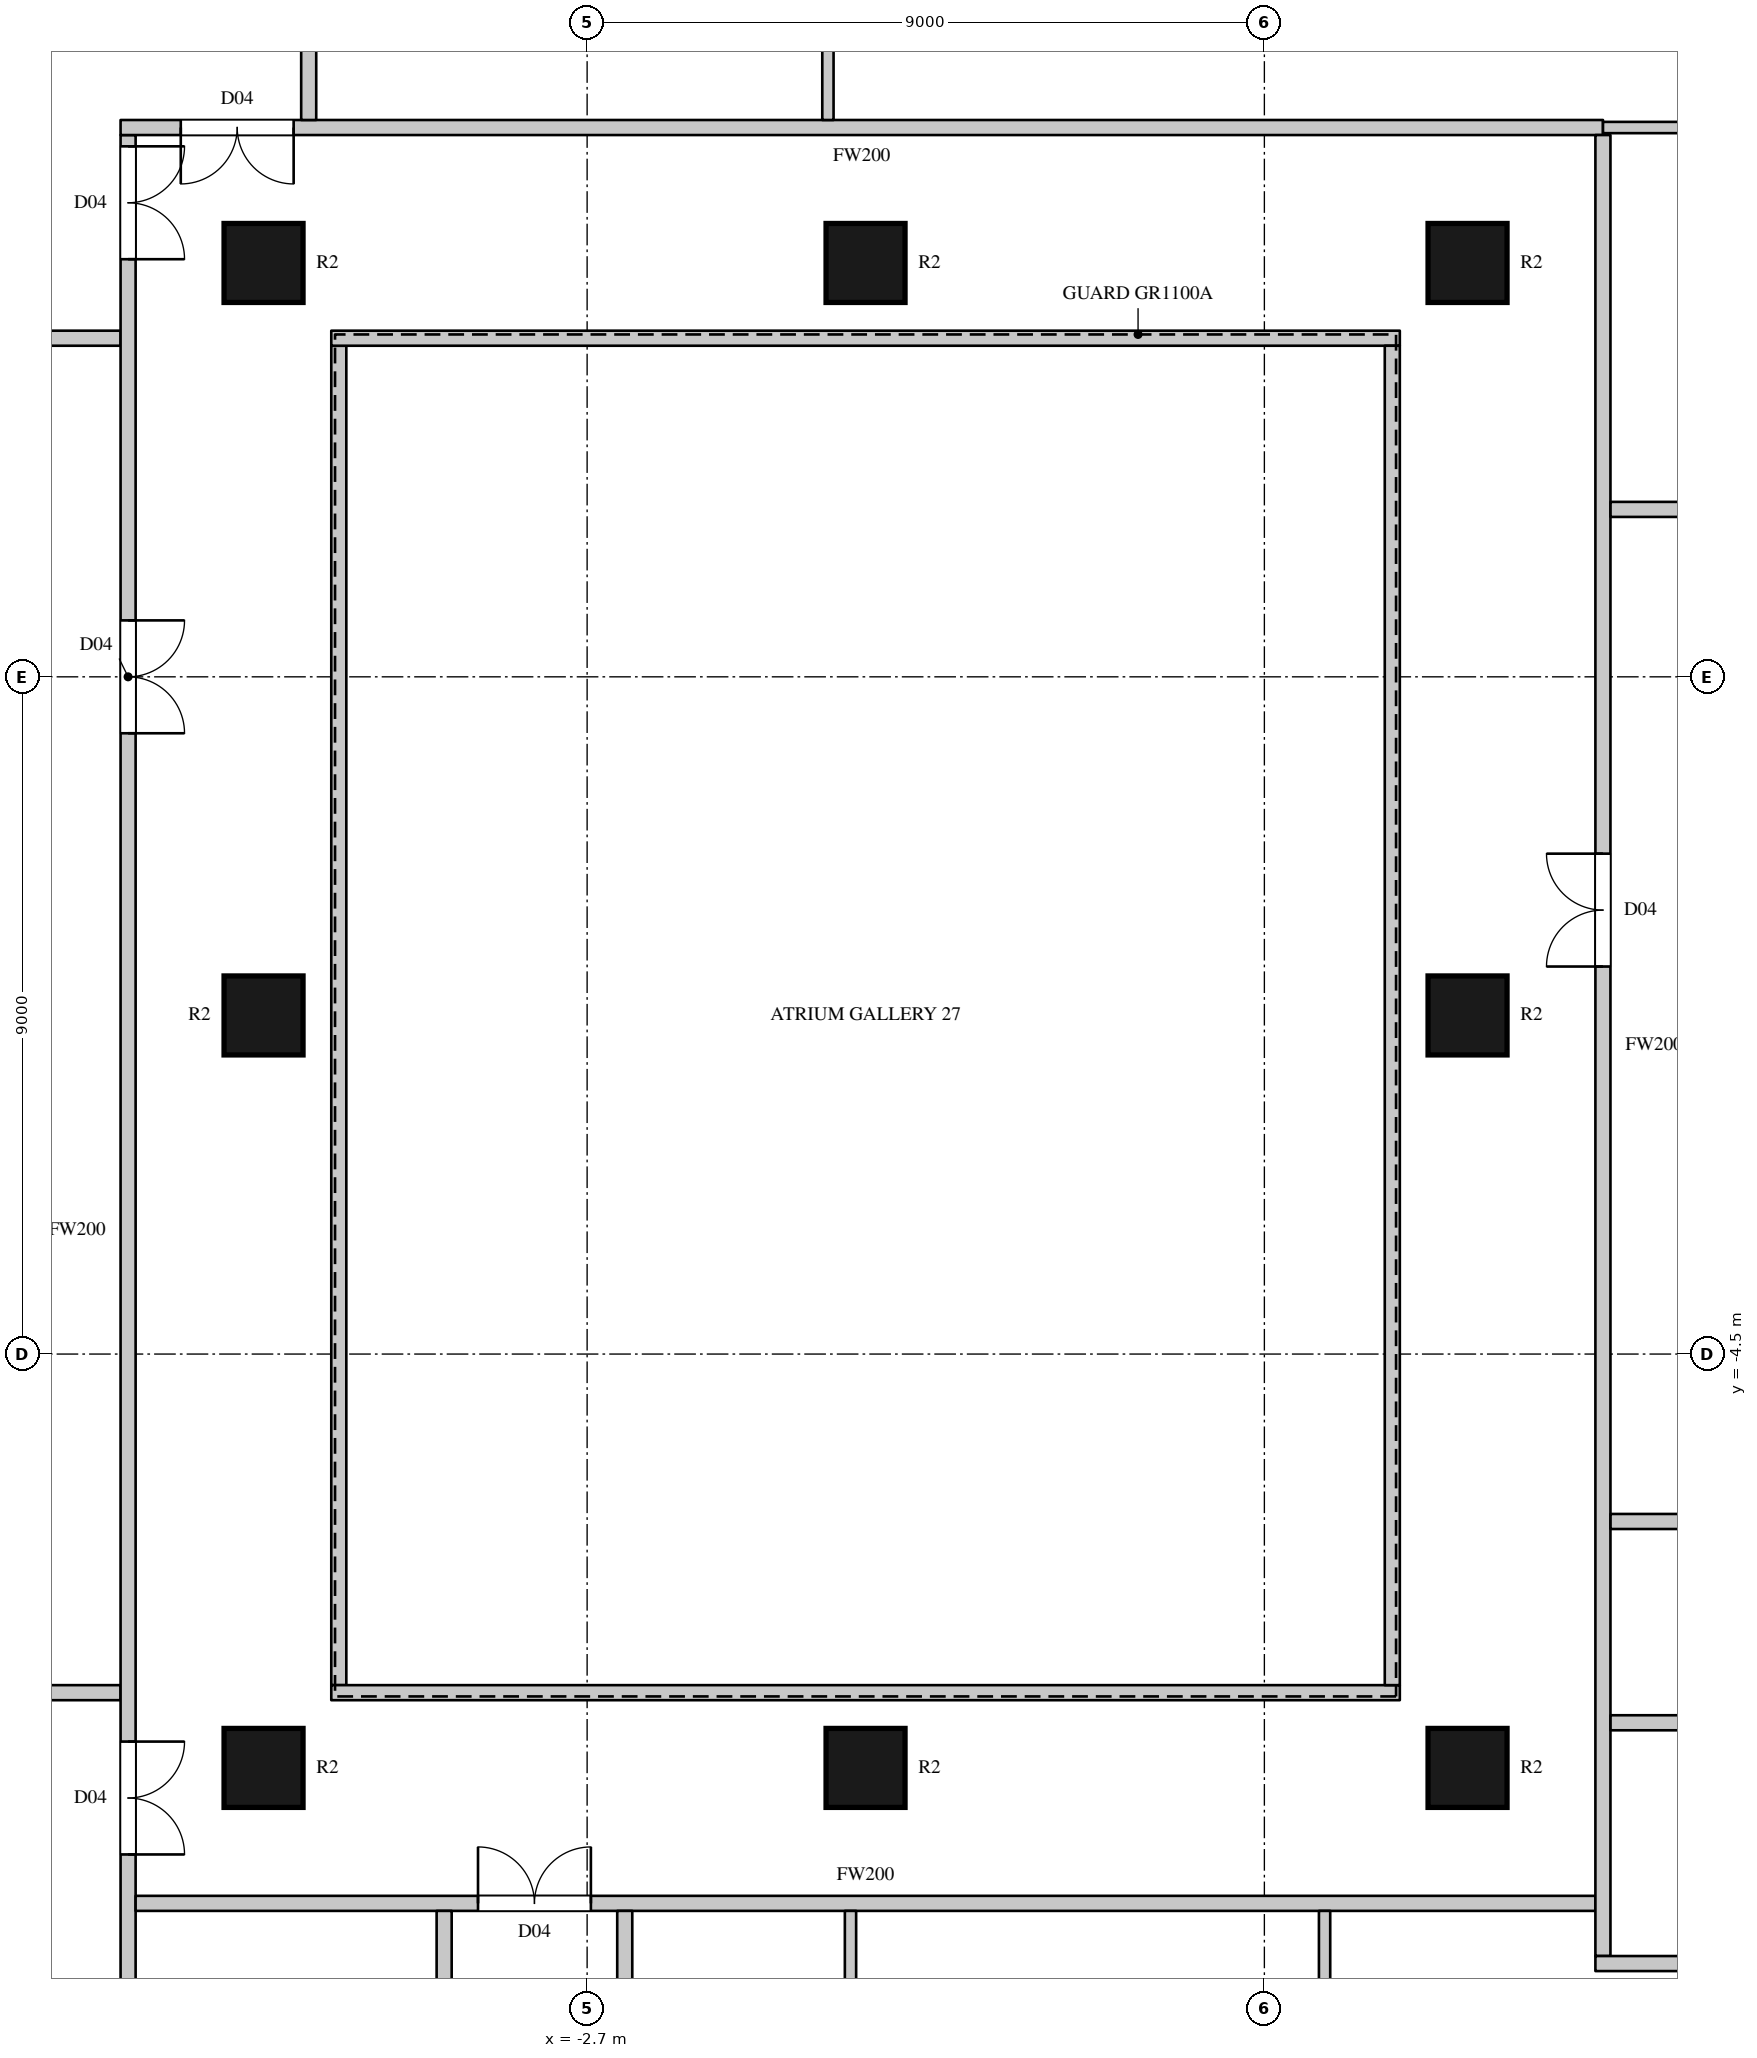
"""IFC4 building model, lengths in metres.
Left out: names, types, materials, properties, quantities, classifications, styles, units other than length and angle.
Written with IfcOpenShell. Run it as: python <this file> out.ifc"""

import sys

from ifc_helpers import new_model, si_unit, direction, frame, frame_2d, origin, origin_2d, place, context, subcontext, project, spatial, rectangle, circle, extrude, element, fill, save


model = new_model("IFC4")
c1 = context("Model", 3, precision=1e-05, world=origin(), true_north=direction((0.0, 1.0)))
c2 = subcontext(c1, "Body", "Model", "MODEL_VIEW")
j1 = project(units=[si_unit("LENGTHUNIT", "METRE"), si_unit("PLANEANGLEUNIT", "RADIAN")], contexts=[c1])
p1 = place(None, origin())
s1 = spatial("IfcSite", under=j1, at=p1, CompositionType="ELEMENT")
p2 = place(p1, origin())
s2 = spatial("IfcBuilding", under=s1, at=p2, CompositionType="ELEMENT")
p3 = place(p2, frame((0.0, 0.0, 127.5)))
s3 = spatial("IfcBuildingStorey", under=s2, at=p3, CompositionType="ELEMENT", Elevation=127.5)
for number, where, z_axis, x_axis in (
    (1, (-7.0, -10.0, 0.0), (0.0, 0.0, 1.0), (1.0, 0.0, 0.0)),
    (2, (-7.0, 0.0, 0.0), (0.0, 0.0, 1.0), (1.0, 0.0, 0.0)),
    (3, (-7.0, 10.0, 0.0), (0.0, 0.0, 1.0), (1.0, 0.0, 0.0)),
    (4, (1.0, -10.0, 0.0), (0.0, 0.0, 1.0), (1.0, 0.0, 0.0)),
    (5, (1.0, 10.0, 0.0), (0.0, 0.0, 1.0), (1.0, 0.0, 0.0)),
    (6, (9.0, -10.0, 0.0), (0.0, 0.0, 1.0), (1.0, 0.0, 0.0)),
    (7, (9.0, 0.0, 0.0), (0.0, 0.0, 1.0), (1.0, 0.0, 0.0)),
    (8, (9.0, 10.0, 0.0), (0.0, 0.0, 1.0), (1.0, 0.0, 0.0)),
):
    element("IfcColumn", number, at=place(p3, frame(where, z_axis=z_axis, x_axis=x_axis)), inside=s3, PredefinedType="COLUMN", context=c2, shape_type="SweptSolid", body=[
        extrude(circle(Radius=0.525, at=origin_2d()), origin(), (0.0, 0.0, 1.0), 3.6),
    ])
p4 = place(p3, frame((-13.97, -9.0, 0.0), z_axis=(0.0, 0.0, 1.0), x_axis=(1.0, 0.0, 0.0)))
e9 = element("IfcWall", 9, at=p4, inside=s3, PredefinedType="PARTITIONING", context=c2, shape_type="SweptSolid", body=[
    extrude(rectangle(XDim=5.07, YDim=0.2, at=frame_2d((2.535, 0.0))), origin(), (0.0, 0.0, 1.0), 3.3),
])
p5 = place(p4, frame((0.4, 0.0, 0.0)))
e10 = element("IfcOpeningElement", 10, at=p5, cuts=e9, PredefinedType="OPENING", context=c2, shape_type="SweptSolid", body=[
    extrude(rectangle(XDim=1.5, YDim=2.2, at=frame_2d((0.75, 1.1))), frame((0.0, 0.11, 0.0), z_axis=(0.0, -1.0, 0.0), x_axis=(1.0, 0.0, 0.0)), (0.0, 0.0, 1.0), 0.22),
])
p6 = place(p4, frame((2.05, 0.0, 0.0)))
e11 = element("IfcOpeningElement", 11, at=p6, cuts=e9, PredefinedType="OPENING", context=c2, shape_type="SweptSolid", body=[
    extrude(rectangle(XDim=1.5, YDim=2.2, at=frame_2d((0.75, 1.1))), frame((0.0, 0.11, 0.0), z_axis=(0.0, -1.0, 0.0), x_axis=(1.0, 0.0, 0.0)), (0.0, 0.0, 1.0), 0.22),
])
p7 = place(p3, frame((-13.97, 9.0, 0.0), z_axis=(0.0, 0.0, 1.0), x_axis=(1.0, 0.0, 0.0)))
e12 = element("IfcWall", 12, at=p7, inside=s3, PredefinedType="PARTITIONING", context=c2, shape_type="SweptSolid", body=[
    extrude(rectangle(XDim=5.07, YDim=0.2, at=frame_2d((2.535, 0.0))), origin(), (0.0, 0.0, 1.0), 3.3),
])
p8 = place(p3, frame((-8.8, -17.4, 0.0), z_axis=(0.0, 0.0, 1.0), x_axis=(0.0, 1.0, 0.0)))
e13 = element("IfcWall", 13, at=p8, inside=s3, PredefinedType="PARTITIONING", context=c2, shape_type="SweptSolid", body=[
    extrude(rectangle(XDim=29.1, YDim=0.2, at=frame_2d((14.55, 0.0))), origin(), (0.0, 0.0, 1.0), 3.3),
])
p9 = place(p8, frame((21.15, 0.0, 0.0)))
e14 = element("IfcOpeningElement", 14, at=p9, cuts=e13, PredefinedType="OPENING", context=c2, shape_type="SweptSolid", body=[
    extrude(rectangle(XDim=1.5, YDim=2.2, at=frame_2d((0.75, 1.1))), frame((0.0, 0.11, 0.0), z_axis=(0.0, -1.0, 0.0), x_axis=(1.0, 0.0, 0.0)), (0.0, 0.0, 1.0), 0.22),
])
p10 = place(p8, frame((6.25, 0.0, 0.0)))
e15 = element("IfcOpeningElement", 15, at=p10, cuts=e13, PredefinedType="OPENING", context=c2, shape_type="SweptSolid", body=[
    extrude(rectangle(XDim=1.5, YDim=2.2, at=frame_2d((0.75, 1.1))), frame((0.0, 0.11, 0.0), z_axis=(0.0, -1.0, 0.0), x_axis=(1.0, 0.0, 0.0)), (0.0, 0.0, 1.0), 0.22),
])
p11 = place(p8, frame((27.45, 0.0, 0.0)))
e16 = element("IfcOpeningElement", 16, at=p11, cuts=e13, PredefinedType="OPENING", context=c2, shape_type="SweptSolid", body=[
    extrude(rectangle(XDim=1.5, YDim=2.2, at=frame_2d((0.75, 1.1))), frame((0.0, 0.11, 0.0), z_axis=(0.0, -1.0, 0.0), x_axis=(1.0, 0.0, 0.0)), (0.0, 0.0, 1.0), 0.22),
])
p12 = place(p8, frame((0.15, 0.0, 0.0)))
e17 = element("IfcOpeningElement", 17, at=p12, cuts=e13, PredefinedType="OPENING", context=c2, shape_type="SweptSolid", body=[
    extrude(rectangle(XDim=0.9, YDim=2.2, at=frame_2d((0.45, 1.1))), frame((0.0, 0.11, 0.0), z_axis=(0.0, -1.0, 0.0), x_axis=(1.0, 0.0, 0.0)), (0.0, 0.0, 1.0), 0.22),
])
p13 = place(p3, frame((-8.7, -11.8, 0.0), z_axis=(0.0, 0.0, 1.0), x_axis=(1.0, 0.0, 0.0)))
e18 = element("IfcWall", 18, at=p13, inside=s3, PredefinedType="PARTITIONING", context=c2, shape_type="SweptSolid", body=[
    extrude(rectangle(XDim=19.4, YDim=0.2, at=frame_2d((9.7, 0.0))), origin(), (0.0, 0.0, 1.0), 3.3),
])
p14 = place(p13, frame((4.55, 0.0, 0.0)))
e19 = element("IfcOpeningElement", 19, at=p14, cuts=e18, PredefinedType="OPENING", context=c2, shape_type="SweptSolid", body=[
    extrude(rectangle(XDim=1.5, YDim=2.2, at=frame_2d((0.75, 1.1))), frame((0.0, 0.11, 0.0), z_axis=(0.0, -1.0, 0.0), x_axis=(1.0, 0.0, 0.0)), (0.0, 0.0, 1.0), 0.22),
])
p15 = place(p3, frame((-8.9, 11.8, 0.0), z_axis=(0.0, 0.0, 1.0), x_axis=(1.0, 0.0, 0.0)))
e20 = element("IfcWall", 20, at=p15, inside=s3, PredefinedType="PARTITIONING", context=c2, shape_type="SweptSolid", body=[
    extrude(rectangle(XDim=19.7, YDim=0.2, at=frame_2d((9.85, 0.0))), origin(), (0.0, 0.0, 1.0), 3.3),
])
p16 = place(p15, frame((0.8, 0.0, 0.0)))
e21 = element("IfcOpeningElement", 21, at=p16, cuts=e20, PredefinedType="OPENING", context=c2, shape_type="SweptSolid", body=[
    extrude(rectangle(XDim=1.5, YDim=2.2, at=frame_2d((0.75, 1.1))), frame((0.0, 0.11, 0.0), z_axis=(0.0, -1.0, 0.0), x_axis=(1.0, 0.0, 0.0)), (0.0, 0.0, 1.0), 0.22),
])
p17 = place(p3, frame((-6.4, 11.9, 0.0), z_axis=(0.0, 0.0, 1.0), x_axis=(0.0, 1.0, 0.0)))
e22 = element("IfcWall", 22, at=p17, inside=s3, PredefinedType="PARTITIONING", context=c2, shape_type="SweptSolid", body=[
    extrude(rectangle(XDim=5.5, YDim=0.2, at=frame_2d((2.75, 0.0))), origin(), (0.0, 0.0, 1.0), 3.3),
])
p18 = place(p17, frame((3.75, 0.0, 0.0)))
e23 = element("IfcOpeningElement", 23, at=p18, cuts=e22, PredefinedType="OPENING", context=c2, shape_type="SweptSolid", body=[
    extrude(rectangle(XDim=1.6, YDim=2.4, at=frame_2d((0.8, 1.2))), frame((0.0, 0.11, 0.0), z_axis=(0.0, -1.0, 0.0), x_axis=(1.0, 0.0, 0.0)), (0.0, 0.0, 1.0), 0.22),
])
p19 = place(p3, frame((-6.0, -8.9, 0.0), z_axis=(0.0, 0.0, 1.0), x_axis=(0.0, 1.0, 0.0)))
e24 = element("IfcWall", 24, at=p19, inside=s3, PredefinedType="PARTITIONING", context=c2, shape_type="SweptSolid", body=[
    extrude(rectangle(XDim=17.8, YDim=0.2, at=frame_2d((8.9, 0.0))), origin(), (0.0, 0.0, 1.0), 3.3),
])
for number, where, z_axis, x_axis in (
    (25, (-6.1, -9.0, 0.0), (0.0, 0.0, 1.0), (1.0, 0.0, 0.0)),
    (26, (-6.1, 9.0, 0.0), (0.0, 0.0, 1.0), (1.0, 0.0, 0.0)),
):
    element("IfcWall", number, at=place(p3, frame(where, z_axis=z_axis, x_axis=x_axis)), inside=s3, PredefinedType="PARTITIONING", context=c2, shape_type="SweptSolid", body=[
        extrude(rectangle(XDim=14.2, YDim=0.2, at=frame_2d((7.1, 0.0))), origin(), (0.0, 0.0, 1.0), 3.3),
    ])
p20 = place(p3, frame((-4.6, -17.4, 0.0), z_axis=(0.0, 0.0, 1.0), x_axis=(0.0, 1.0, 0.0)))
e27 = element("IfcWall", 27, at=p20, inside=s3, PredefinedType="PARTITIONING", context=c2, shape_type="SweptSolid", body=[
    extrude(rectangle(XDim=5.5, YDim=0.2, at=frame_2d((2.75, 0.0))), origin(), (0.0, 0.0, 1.0), 3.3),
])
p21 = place(p3, frame((-2.2, -17.178, 0.0), z_axis=(0.0, 0.0, 1.0), x_axis=(0.0, 1.0, 0.0)))
e28 = element("IfcWall", 28, at=p21, inside=s3, PredefinedType="PARTITIONING", context=c2, shape_type="SweptSolid", body=[
    extrude(rectangle(XDim=5.279, YDim=0.2, at=frame_2d((2.639, 0.0))), origin(), (0.0, 0.0, 1.0), 3.3),
])
p22 = place(p21, frame((0.35, 0.0, 0.0)))
e29 = element("IfcOpeningElement", 29, at=p22, cuts=e28, PredefinedType="OPENING", context=c2, shape_type="SweptSolid", body=[
    extrude(rectangle(XDim=0.9, YDim=2.2, at=frame_2d((0.45, 1.1))), frame((0.0, 0.11, 0.0), z_axis=(0.0, -1.0, 0.0), x_axis=(1.0, 0.0, 0.0)), (0.0, 0.0, 1.0), 0.22),
])
p23 = place(p3, frame((8.0, -8.9, 0.0), z_axis=(0.0, 0.0, 1.0), x_axis=(0.0, 1.0, 0.0)))
e30 = element("IfcWall", 30, at=p23, inside=s3, PredefinedType="PARTITIONING", context=c2, shape_type="SweptSolid", body=[
    extrude(rectangle(XDim=17.8, YDim=0.2, at=frame_2d((8.9, 0.0))), origin(), (0.0, 0.0, 1.0), 3.3),
])
p24 = place(p3, frame((10.799, -12.5, 0.0), z_axis=(0.0, 0.0, 1.0), x_axis=(0.0, 1.0, 0.0)))
e31 = element("IfcWall", 31, at=p24, inside=s3, PredefinedType="PARTITIONING", context=c2, shape_type="SweptSolid", body=[
    extrude(rectangle(XDim=24.2, YDim=0.2, at=frame_2d((12.1, 0.0))), origin(), (0.0, 0.0, 1.0), 3.3),
])
p25 = place(p24, frame((13.15, 0.0, 0.0)))
e32 = element("IfcOpeningElement", 32, at=p25, cuts=e31, PredefinedType="OPENING", context=c2, shape_type="SweptSolid", body=[
    extrude(rectangle(XDim=1.5, YDim=2.2, at=frame_2d((0.75, 1.1))), frame((0.0, 0.11, 0.0), z_axis=(0.0, -1.0, 0.0), x_axis=(1.0, 0.0, 0.0)), (0.0, 0.0, 1.0), 0.22),
])
p26 = place(p3, frame((10.699, -12.6, 0.0), z_axis=(0.0, 0.0, 1.0), x_axis=(1.0, 0.0, 0.0)))
e33 = element("IfcWall", 33, at=p26, inside=s3, PredefinedType="PARTITIONING", context=c2, shape_type="SweptSolid", body=[
    extrude(rectangle(XDim=5.501, YDim=0.2, at=frame_2d((2.75, 0.0))), origin(), (0.0, 0.0, 1.0), 3.3),
])
p27 = place(p3, frame((10.9, -9.4, 0.0), z_axis=(0.0, 0.0, 1.0), x_axis=(1.0, 0.0, 0.0)))
e34 = element("IfcWall", 34, at=p27, inside=s3, PredefinedType="PARTITIONING", context=c2, shape_type="SweptSolid", body=[
    extrude(rectangle(XDim=5.3, YDim=0.2, at=frame_2d((2.65, 0.0))), origin(), (0.0, 0.0, 1.0), 3.3),
])
p28 = place(p27, frame((4.05, 0.0, 0.0)))
e35 = element("IfcOpeningElement", 35, at=p28, cuts=e34, PredefinedType="OPENING", context=c2, shape_type="SweptSolid", body=[
    extrude(rectangle(XDim=0.95, YDim=2.2, at=frame_2d((0.475, 1.1))), frame((0.0, 0.11, 0.0), z_axis=(0.0, -1.0, 0.0), x_axis=(1.0, 0.0, 0.0)), (0.0, 0.0, 1.0), 0.22),
])
p29 = place(p3, frame((10.9, -6.725, 0.0), z_axis=(0.0, 0.0, 1.0), x_axis=(1.0, 0.0, 0.0)))
e36 = element("IfcWall", 36, at=p29, inside=s3, PredefinedType="PARTITIONING", context=c2, shape_type="SweptSolid", body=[
    extrude(rectangle(XDim=5.3, YDim=0.2, at=frame_2d((2.65, 0.0))), origin(), (0.0, 0.0, 1.0), 3.3),
])
p30 = place(p3, frame((10.9, 6.725, 0.0), z_axis=(0.0, 0.0, 1.0), x_axis=(1.0, 0.0, 0.0)))
e37 = element("IfcWall", 37, at=p30, inside=s3, PredefinedType="PARTITIONING", context=c2, shape_type="SweptSolid", body=[
    extrude(rectangle(XDim=5.3, YDim=0.2, at=frame_2d((2.65, 0.0))), origin(), (0.0, 0.0, 1.0), 3.3),
])
p31 = place(p30, frame((4.1, 0.0, 0.0)))
e38 = element("IfcOpeningElement", 38, at=p31, cuts=e37, PredefinedType="OPENING", context=c2, shape_type="SweptSolid", body=[
    extrude(rectangle(XDim=0.9, YDim=2.2, at=frame_2d((0.45, 1.1))), frame((0.0, 0.11, 0.0), z_axis=(0.0, -1.0, 0.0), x_axis=(1.0, 0.0, 0.0)), (0.0, 0.0, 1.0), 0.22),
])
for number, where, z_axis, x_axis in (
    (39, (0.5, 11.9, 0.0), (0.0, 0.0, 1.0), (0.0, 1.0, 0.0)),
    (40, (0.8, -17.4, 0.0), (0.0, 0.0, 1.0), (0.0, 1.0, 0.0)),
    (41, (7.1, -17.4, 0.0), (0.0, 0.0, 1.0), (0.0, 1.0, 0.0)),
):
    element("IfcWall", number, at=place(p3, frame(where, z_axis=z_axis, x_axis=x_axis)), inside=s3, PredefinedType="PARTITIONING", context=c2, shape_type="SweptSolid", body=[
        extrude(rectangle(XDim=5.5, YDim=0.15, at=frame_2d((2.75, 0.0))), origin(), (0.0, 0.0, 1.0), 3.3),
    ])
p32 = place(p3, frame((10.8, 11.8, 0.0), z_axis=(0.0, 0.0, 1.0), x_axis=(1.0, 0.0, 0.0)))
e42 = element("IfcWall", 42, at=p32, inside=s3, PredefinedType="PARTITIONING", context=c2, shape_type="SweptSolid", body=[
    extrude(rectangle(XDim=5.2, YDim=0.15, at=frame_2d((2.6, 0.0))), origin(), (0.0, 0.0, 1.0), 3.3),
])
p33 = place(p9, origin())
e43 = element("IfcDoor", 43, at=p33, inside=s3, OperationType="DOUBLE_DOOR_SINGLE_SWING", PredefinedType="DOOR", context=c2, shape_type="SweptSolid", body=[
    extrude(rectangle(XDim=1.5, YDim=2.2, at=frame_2d((0.75, 1.1))), frame((0.0, 0.025, 0.0), z_axis=(0.0, -1.0, 0.0), x_axis=(1.0, 0.0, 0.0)), (0.0, 0.0, 1.0), 0.05),
])
fill(e14, e43)
p34 = place(p10, origin())
e44 = element("IfcDoor", 44, at=p34, inside=s3, OperationType="DOUBLE_DOOR_SINGLE_SWING", PredefinedType="DOOR", context=c2, shape_type="SweptSolid", body=[
    extrude(rectangle(XDim=1.5, YDim=2.2, at=frame_2d((0.75, 1.1))), frame((0.0, 0.025, 0.0), z_axis=(0.0, -1.0, 0.0), x_axis=(1.0, 0.0, 0.0)), (0.0, 0.0, 1.0), 0.05),
])
fill(e15, e44)
p35 = place(p11, origin())
e45 = element("IfcDoor", 45, at=p35, inside=s3, OperationType="DOUBLE_DOOR_SINGLE_SWING", PredefinedType="DOOR", context=c2, shape_type="SweptSolid", body=[
    extrude(rectangle(XDim=1.5, YDim=2.2, at=frame_2d((0.75, 1.1))), frame((0.0, 0.025, 0.0), z_axis=(0.0, -1.0, 0.0), x_axis=(1.0, 0.0, 0.0)), (0.0, 0.0, 1.0), 0.05),
])
fill(e16, e45)
p36 = place(p14, origin())
e46 = element("IfcDoor", 46, at=p36, inside=s3, OperationType="DOUBLE_DOOR_SINGLE_SWING", PredefinedType="DOOR", context=c2, shape_type="SweptSolid", body=[
    extrude(rectangle(XDim=1.5, YDim=2.2, at=frame_2d((0.75, 1.1))), frame((0.0, 0.025, 0.0), z_axis=(0.0, -1.0, 0.0), x_axis=(1.0, 0.0, 0.0)), (0.0, 0.0, 1.0), 0.05),
])
fill(e19, e46)
p37 = place(p16, origin())
e47 = element("IfcDoor", 47, at=p37, inside=s3, OperationType="DOUBLE_DOOR_SINGLE_SWING", PredefinedType="DOOR", context=c2, shape_type="SweptSolid", body=[
    extrude(rectangle(XDim=1.5, YDim=2.2, at=frame_2d((0.75, 1.1))), frame((0.0, 0.025, 0.0), z_axis=(0.0, -1.0, 0.0), x_axis=(1.0, 0.0, 0.0)), (0.0, 0.0, 1.0), 0.05),
])
fill(e21, e47)
p38 = place(p25, origin())
e48 = element("IfcDoor", 48, at=p38, inside=s3, OperationType="DOUBLE_DOOR_SINGLE_SWING", PredefinedType="DOOR", context=c2, shape_type="SweptSolid", body=[
    extrude(rectangle(XDim=1.5, YDim=2.2, at=frame_2d((0.75, 1.1))), frame((0.0, 0.025, 0.0), z_axis=(0.0, -1.0, 0.0), x_axis=(1.0, 0.0, 0.0)), (0.0, 0.0, 1.0), 0.05),
])
fill(e32, e48)
save(model, sys.argv[1])
